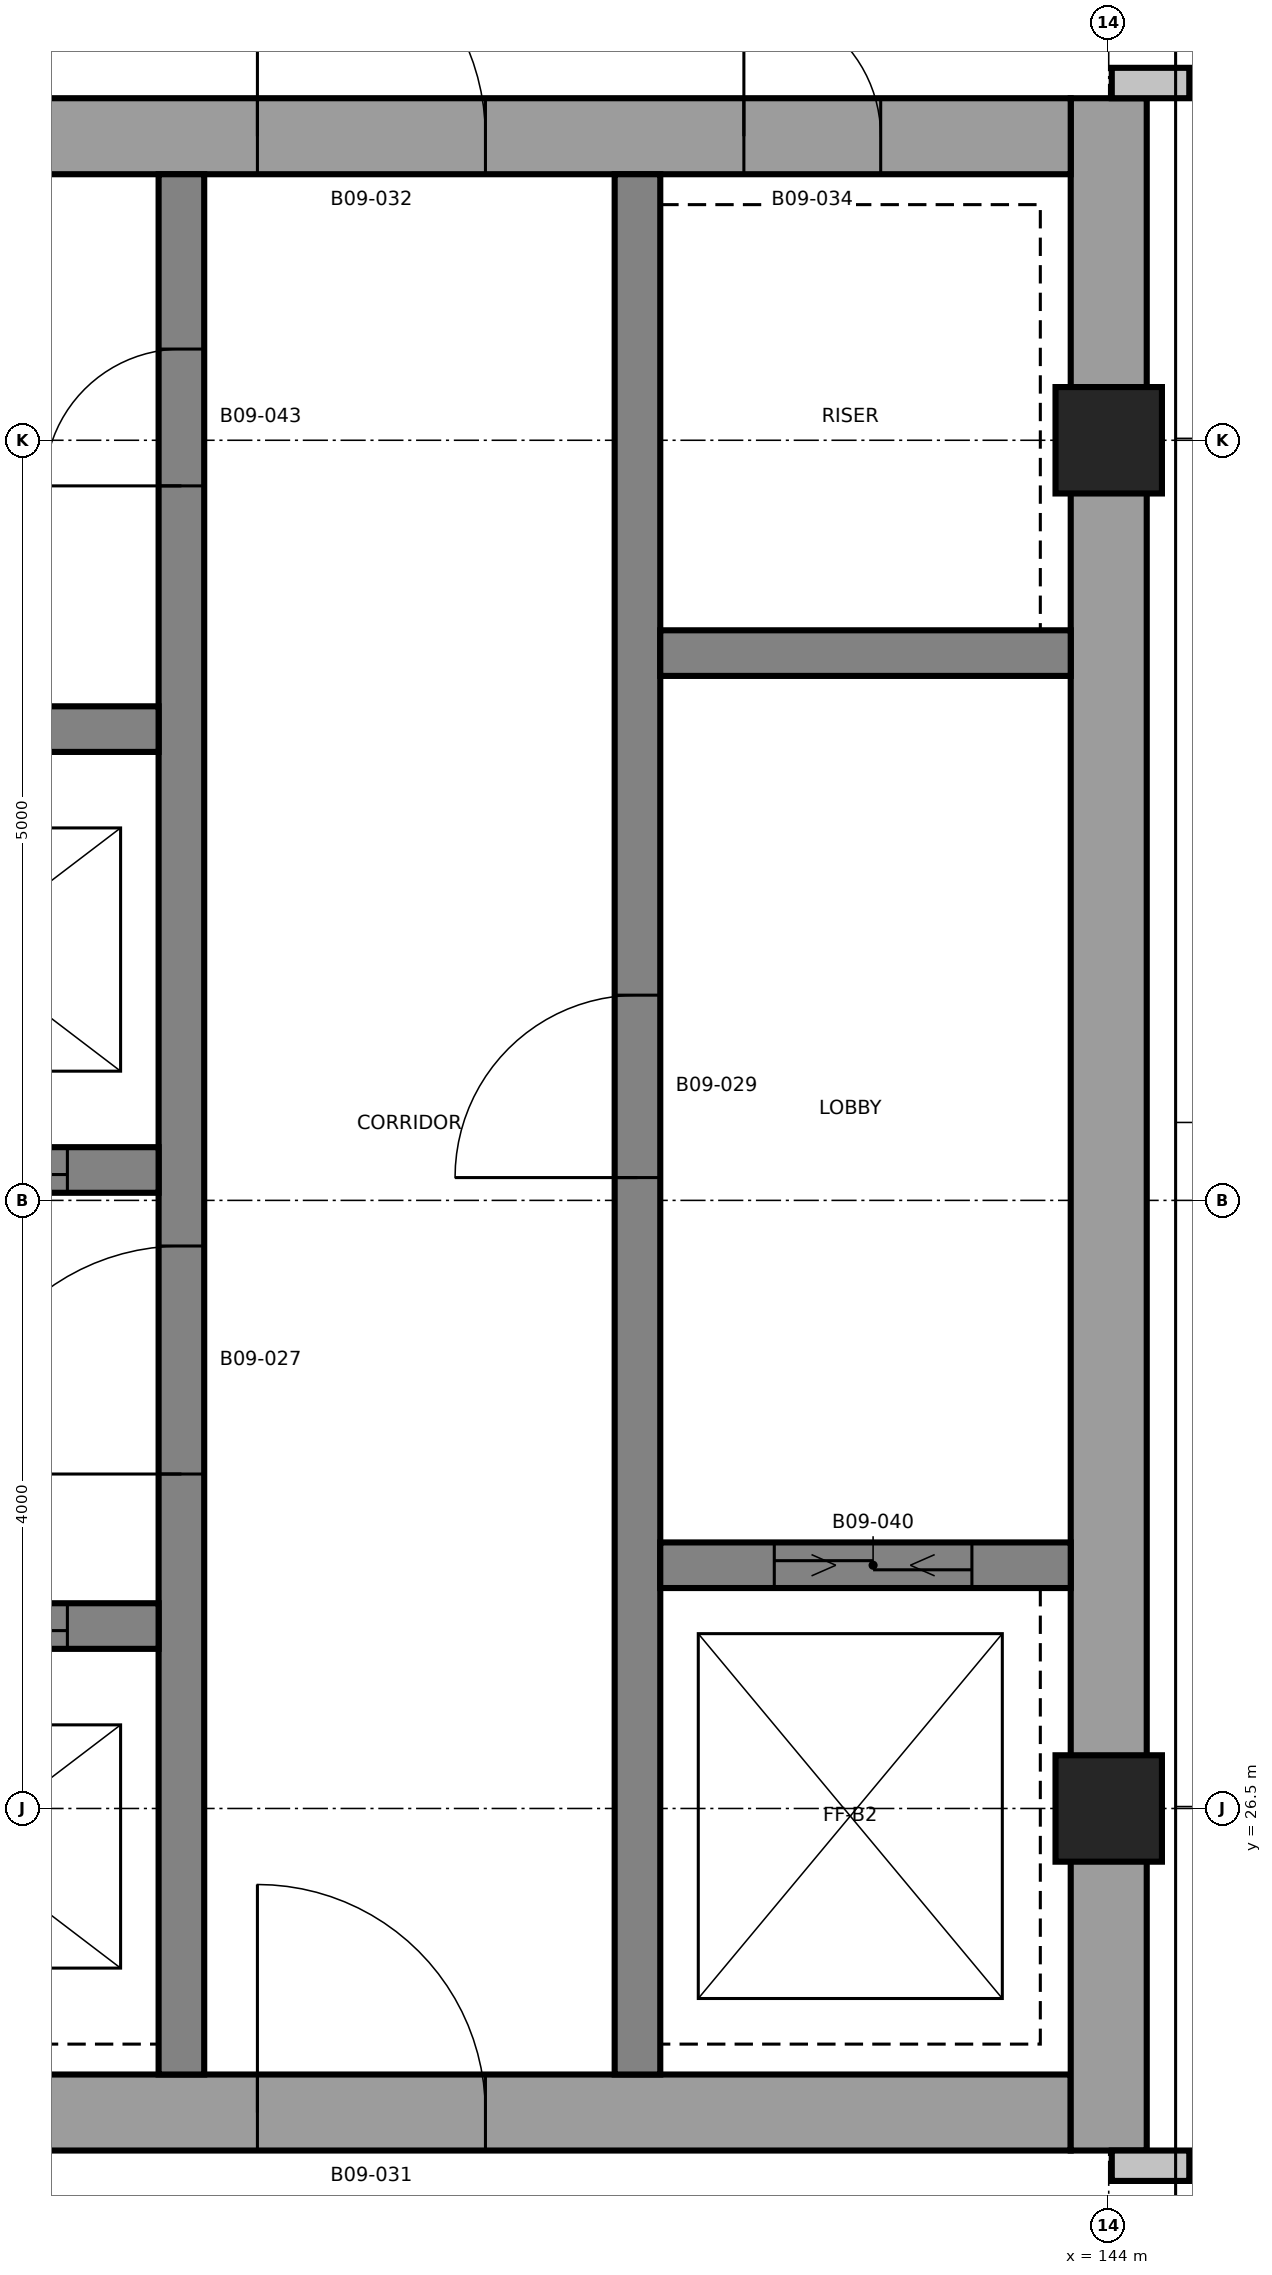
"""IFC4 building model, lengths in metres.
Left out: names, types, materials, properties, quantities, classifications, styles, units other than length and angle.
Written with IfcOpenShell. Run it as: python <this file> out.ifc"""

import sys

from ifc_helpers import new_model, si_unit, direction, frame, frame_2d, origin, origin_2d, place, context, subcontext, project, spatial, rectangle, extrude, element, fill, save


model = new_model("IFC4")
c1 = context("Model", 3, precision=1e-05, world=origin(), true_north=direction((0.0, 1.0)))
c2 = subcontext(c1, "Body", "Model", "MODEL_VIEW")
j1 = project(units=[si_unit("LENGTHUNIT", "METRE"), si_unit("PLANEANGLEUNIT", "RADIAN")], contexts=[c1])
p1 = place(None, origin())
s1 = spatial("IfcSite", under=j1, at=p1, CompositionType="ELEMENT")
p2 = place(p1, origin())
s2 = spatial("IfcBuilding", under=s1, at=p2, CompositionType="ELEMENT")
p3 = place(p2, frame((0.0, 0.0, 98.2)))
s3 = spatial("IfcBuildingStorey", under=s2, at=p3, CompositionType="ELEMENT", Elevation=98.2)
p4 = place(p3, frame((128.75, 24.5, 0.0), z_axis=(0.0, 0.0, 1.0), x_axis=(1.0, 0.0, 0.0)))
e1 = element("IfcWall", 1, at=p4, inside=s3, PredefinedType="SHEAR", context=c2, shape_type="SweptSolid", body=[
    extrude(rectangle(XDim=15.0, YDim=0.5, at=frame_2d((7.5, 0.0))), origin(), (0.0, 0.0, 1.0), 3.7),
])
p5 = place(p4, frame((9.65, 0.0, 0.0)))
e2 = element("IfcOpeningElement", 2, at=p5, cuts=e1, PredefinedType="OPENING", context=c2, shape_type="SweptSolid", body=[
    extrude(rectangle(XDim=1.5, YDim=2.1, at=frame_2d((0.75, 1.05))), frame((0.0, 0.26, 0.0), z_axis=(0.0, -1.0, 0.0), x_axis=(1.0, 0.0, 0.0)), (0.0, 0.0, 1.0), 0.52),
])
p6 = place(p4, frame((1.25, 0.0, 0.0)))
e3 = element("IfcOpeningElement", 3, at=p6, cuts=e1, PredefinedType="OPENING", context=c2, shape_type="SweptSolid", body=[
    extrude(rectangle(XDim=0.9, YDim=2.1, at=frame_2d((0.45, 1.05))), frame((0.0, 0.26, 0.0), z_axis=(0.0, -1.0, 0.0), x_axis=(1.0, 0.0, 0.0)), (0.0, 0.0, 1.0), 0.52),
])
p7 = place(p3, frame((144.0, 24.25, 0.0), z_axis=(0.0, 0.0, 1.0), x_axis=(0.0, 1.0, 0.0)))
e4 = element("IfcWall", 4, at=p7, inside=s3, PredefinedType="SHEAR", context=c2, shape_type="SweptSolid", body=[
    extrude(rectangle(XDim=13.5, YDim=0.5, at=frame_2d((6.75, 0.0))), origin(), (0.0, 0.0, 1.0), 3.7),
])
p8 = place(p3, frame((128.75, 37.5, 0.0), z_axis=(0.0, 0.0, 1.0), x_axis=(1.0, 0.0, 0.0)))
e5 = element("IfcWall", 5, at=p8, inside=s3, PredefinedType="SHEAR", context=c2, shape_type="SweptSolid", body=[
    extrude(rectangle(XDim=15.0, YDim=0.5, at=frame_2d((7.5, 0.0))), origin(), (0.0, 0.0, 1.0), 3.7),
])
p9 = place(p8, frame((9.65, 0.0, 0.0)))
e6 = element("IfcOpeningElement", 6, at=p9, cuts=e5, PredefinedType="OPENING", context=c2, shape_type="SweptSolid", body=[
    extrude(rectangle(XDim=1.5, YDim=2.1, at=frame_2d((0.75, 1.05))), frame((0.0, 0.26, 0.0), z_axis=(0.0, -1.0, 0.0), x_axis=(1.0, 0.0, 0.0)), (0.0, 0.0, 1.0), 0.52),
])
p10 = place(p8, frame((12.85, 0.0, 0.0)))
e7 = element("IfcOpeningElement", 7, at=p10, cuts=e5, PredefinedType="OPENING", context=c2, shape_type="SweptSolid", body=[
    extrude(rectangle(XDim=0.9, YDim=2.1, at=frame_2d((0.45, 1.05))), frame((0.0, 0.26, 0.0), z_axis=(0.0, -1.0, 0.0), x_axis=(1.0, 0.0, 0.0)), (0.0, 0.0, 1.0), 0.52),
])
p11 = place(p8, frame((3.6, 0.0, 0.0)))
e8 = element("IfcOpeningElement", 8, at=p11, cuts=e5, PredefinedType="OPENING", context=c2, shape_type="SweptSolid", body=[
    extrude(rectangle(XDim=0.9, YDim=2.1, at=frame_2d((0.45, 1.05))), frame((0.0, 0.26, 0.0), z_axis=(0.0, -1.0, 0.0), x_axis=(1.0, 0.0, 0.0)), (0.0, 0.0, 1.0), 0.52),
])
p12 = place(p8, frame((6.5, 0.0, 0.0)))
e9 = element("IfcOpeningElement", 9, at=p12, cuts=e5, PredefinedType="OPENING", context=c2, shape_type="SweptSolid", body=[
    extrude(rectangle(XDim=0.9, YDim=2.1, at=frame_2d((0.45, 1.05))), frame((0.0, 0.26, 0.0), z_axis=(0.0, -1.0, 0.0), x_axis=(1.0, 0.0, 0.0)), (0.0, 0.0, 1.0), 0.52),
])
p13 = place(p3, frame((137.9, 24.75, 0.0), z_axis=(0.0, 0.0, 1.0), x_axis=(0.0, 1.0, 0.0)))
e10 = element("IfcWall", 10, at=p13, inside=s3, PredefinedType="SHEAR", context=c2, shape_type="SweptSolid", body=[
    extrude(rectangle(XDim=12.5, YDim=0.3, at=frame_2d((6.25, 0.0))), origin(), (0.0, 0.0, 1.0), 3.7),
])
p14 = place(p13, frame((3.95, 0.0, 0.0)))
e11 = element("IfcOpeningElement", 11, at=p14, cuts=e10, PredefinedType="OPENING", context=c2, shape_type="SweptSolid", body=[
    extrude(rectangle(XDim=1.5, YDim=2.1, at=frame_2d((0.75, 1.05))), frame((0.0, 0.16, 0.0), z_axis=(0.0, -1.0, 0.0), x_axis=(1.0, 0.0, 0.0)), (0.0, 0.0, 1.0), 0.32),
])
p15 = place(p13, frame((10.45, 0.0, 0.0)))
e12 = element("IfcOpeningElement", 12, at=p15, cuts=e10, PredefinedType="OPENING", context=c2, shape_type="SweptSolid", body=[
    extrude(rectangle(XDim=0.9, YDim=2.1, at=frame_2d((0.45, 1.05))), frame((0.0, 0.16, 0.0), z_axis=(0.0, -1.0, 0.0), x_axis=(1.0, 0.0, 0.0)), (0.0, 0.0, 1.0), 0.32),
])
p16 = place(p3, frame((140.9, 24.75, 0.0), z_axis=(0.0, 0.0, 1.0), x_axis=(0.0, 1.0, 0.0)))
e13 = element("IfcWall", 13, at=p16, inside=s3, PredefinedType="SHEAR", context=c2, shape_type="SweptSolid", body=[
    extrude(rectangle(XDim=12.5, YDim=0.3, at=frame_2d((6.25, 0.0))), origin(), (0.0, 0.0, 1.0), 3.7),
])
p17 = place(p16, frame((5.9, 0.0, 0.0)))
e14 = element("IfcOpeningElement", 14, at=p17, cuts=e13, PredefinedType="OPENING", context=c2, shape_type="SweptSolid", body=[
    extrude(rectangle(XDim=1.2, YDim=2.1, at=frame_2d((0.6, 1.05))), frame((0.0, 0.16, 0.0), z_axis=(0.0, -1.0, 0.0), x_axis=(1.0, 0.0, 0.0)), (0.0, 0.0, 1.0), 0.32),
])
p18 = place(p3, frame((132.25, 27.7, 0.0), z_axis=(0.0, 0.0, 1.0), x_axis=(1.0, 0.0, 0.0)))
e15 = element("IfcWall", 15, at=p18, inside=s3, PredefinedType="SHEAR", context=c2, shape_type="SweptSolid", body=[
    extrude(rectangle(XDim=5.5, YDim=0.3, at=frame_2d((2.75, 0.0))), origin(), (0.0, 0.0, 1.0), 3.7),
])
p19 = place(p18, frame((0.9, 0.0, 0.0)))
e16 = element("IfcOpeningElement", 16, at=p19, cuts=e15, PredefinedType="OPENING", context=c2, shape_type="SweptSolid", body=[
    extrude(rectangle(XDim=1.1, YDim=2.4, at=frame_2d((0.55, 1.2))), frame((0.0, 0.16, 0.0), z_axis=(0.0, -1.0, 0.0), x_axis=(1.0, 0.0, 0.0)), (0.0, 0.0, 1.0), 0.32),
])
p20 = place(p18, frame((3.8, 0.0, 0.0)))
e17 = element("IfcOpeningElement", 17, at=p20, cuts=e15, PredefinedType="OPENING", context=c2, shape_type="SweptSolid", body=[
    extrude(rectangle(XDim=1.1, YDim=2.4, at=frame_2d((0.55, 1.2))), frame((0.0, 0.16, 0.0), z_axis=(0.0, -1.0, 0.0), x_axis=(1.0, 0.0, 0.0)), (0.0, 0.0, 1.0), 0.32),
])
p21 = place(p3, frame((132.25, 30.7, 0.0), z_axis=(0.0, 0.0, 1.0), x_axis=(1.0, 0.0, 0.0)))
e18 = element("IfcWall", 18, at=p21, inside=s3, PredefinedType="SHEAR", context=c2, shape_type="SweptSolid", body=[
    extrude(rectangle(XDim=5.5, YDim=0.3, at=frame_2d((2.75, 0.0))), origin(), (0.0, 0.0, 1.0), 3.7),
])
p22 = place(p21, frame((0.9, 0.0, 0.0)))
e19 = element("IfcOpeningElement", 19, at=p22, cuts=e18, PredefinedType="OPENING", context=c2, shape_type="SweptSolid", body=[
    extrude(rectangle(XDim=1.1, YDim=2.4, at=frame_2d((0.55, 1.2))), frame((0.0, 0.16, 0.0), z_axis=(0.0, -1.0, 0.0), x_axis=(1.0, 0.0, 0.0)), (0.0, 0.0, 1.0), 0.32),
])
p23 = place(p21, frame((3.8, 0.0, 0.0)))
e20 = element("IfcOpeningElement", 20, at=p23, cuts=e18, PredefinedType="OPENING", context=c2, shape_type="SweptSolid", body=[
    extrude(rectangle(XDim=1.1, YDim=2.4, at=frame_2d((0.55, 1.2))), frame((0.0, 0.16, 0.0), z_axis=(0.0, -1.0, 0.0), x_axis=(1.0, 0.0, 0.0)), (0.0, 0.0, 1.0), 0.32),
])
p24 = place(p3, frame((132.25, 33.6, 0.0), z_axis=(0.0, 0.0, 1.0), x_axis=(1.0, 0.0, 0.0)))
e21 = element("IfcWall", 21, at=p24, inside=s3, PredefinedType="SHEAR", context=c2, shape_type="SweptSolid", body=[
    extrude(rectangle(XDim=5.5, YDim=0.3, at=frame_2d((2.75, 0.0))), origin(), (0.0, 0.0, 1.0), 3.7),
])
p25 = place(p3, frame((141.05, 28.1, 0.0), z_axis=(0.0, 0.0, 1.0), x_axis=(1.0, 0.0, 0.0)))
e22 = element("IfcWall", 22, at=p25, inside=s3, PredefinedType="SHEAR", context=c2, shape_type="SweptSolid", body=[
    extrude(rectangle(XDim=2.7, YDim=0.3, at=frame_2d((1.35, 0.0))), origin(), (0.0, 0.0, 1.0), 3.7),
])
p26 = place(p25, frame((0.75, 0.0, 0.0)))
e23 = element("IfcOpeningElement", 23, at=p26, cuts=e22, PredefinedType="OPENING", context=c2, shape_type="SweptSolid", body=[
    extrude(rectangle(XDim=1.3, YDim=2.4, at=frame_2d((0.65, 1.2))), frame((0.0, 0.16, 0.0), z_axis=(0.0, -1.0, 0.0), x_axis=(1.0, 0.0, 0.0)), (0.0, 0.0, 1.0), 0.32),
])
p27 = place(p3, frame((141.05, 34.1, 0.0), z_axis=(0.0, 0.0, 1.0), x_axis=(1.0, 0.0, 0.0)))
e24 = element("IfcWall", 24, at=p27, inside=s3, PredefinedType="SHEAR", context=c2, shape_type="SweptSolid", body=[
    extrude(rectangle(XDim=2.7, YDim=0.3, at=frame_2d((1.35, 0.0))), origin(), (0.0, 0.0, 1.0), 3.7),
])
for number, where, z_axis, x_axis in (
    (25, (144.0, 26.5, 0.0), (0.0, 0.0, 1.0), (1.0, 0.0, 0.0)),
    (26, (144.0, 35.5, 0.0), (0.0, 0.0, 1.0), (1.0, 0.0, 0.0)),
):
    element("IfcColumn", number, at=place(p3, frame(where, z_axis=z_axis, x_axis=x_axis)), inside=s3, PredefinedType="COLUMN", context=c2, shape_type="SweptSolid", body=[
        extrude(rectangle(XDim=0.7, YDim=0.7, at=origin_2d()), origin(), (0.0, 0.0, 1.0), 3.7),
    ])
for number, where, z_axis, x_axis in (
    (27, (144.02, 24.15, 0.0), (0.0, 0.0, 1.0), (1.0, 0.0, 0.0)),
    (28, (144.02, 37.85, 0.0), (0.0, 0.0, 1.0), (1.0, 0.0, 0.0)),
):
    element("IfcWall", number, at=place(p3, frame(where, z_axis=z_axis, x_axis=x_axis)), inside=s3, PredefinedType="PARTITIONING", context=c2, shape_type="SweptSolid", body=[
        extrude(rectangle(XDim=0.51, YDim=0.2, at=frame_2d((0.255, 0.0))), origin(), (0.0, 0.0, 1.0), 3.4),
    ])
p28 = place(p14, origin())
e29 = element("IfcDoor", 29, at=p28, inside=s3, OperationType="SINGLE_SWING_RIGHT", PredefinedType="DOOR", context=c2, shape_type="SweptSolid", body=[
    extrude(rectangle(XDim=1.5, YDim=2.1, at=frame_2d((0.75, 1.05))), frame((0.0, 0.025, 0.0), z_axis=(0.0, -1.0, 0.0), x_axis=(1.0, 0.0, 0.0)), (0.0, 0.0, 1.0), 0.05),
])
fill(e11, e29)
p29 = place(p17, origin())
e30 = element("IfcDoor", 30, at=p29, inside=s3, OperationType="SINGLE_SWING_RIGHT", PredefinedType="DOOR", context=c2, shape_type="SweptSolid", body=[
    extrude(rectangle(XDim=1.2, YDim=2.1, at=frame_2d((0.6, 1.05))), frame((0.0, 0.025, 0.0), z_axis=(0.0, -1.0, 0.0), x_axis=(1.0, 0.0, 0.0)), (0.0, 0.0, 1.0), 0.05),
])
fill(e14, e30)
p30 = place(p5, origin())
e31 = element("IfcDoor", 31, at=p30, inside=s3, OperationType="SINGLE_SWING_LEFT", PredefinedType="DOOR", context=c2, shape_type="SweptSolid", body=[
    extrude(rectangle(XDim=1.5, YDim=2.1, at=frame_2d((0.75, 1.05))), frame((0.0, 0.025, 0.0), z_axis=(0.0, -1.0, 0.0), x_axis=(1.0, 0.0, 0.0)), (0.0, 0.0, 1.0), 0.05),
])
fill(e2, e31)
p31 = place(p9, origin())
e32 = element("IfcDoor", 32, at=p31, inside=s3, OperationType="SINGLE_SWING_RIGHT", PredefinedType="DOOR", context=c2, shape_type="SweptSolid", body=[
    extrude(rectangle(XDim=1.5, YDim=2.1, at=frame_2d((0.75, 1.05))), frame((0.0, 0.025, 0.0), z_axis=(0.0, -1.0, 0.0), x_axis=(1.0, 0.0, 0.0)), (0.0, 0.0, 1.0), 0.05),
])
fill(e6, e32)
p32 = place(p10, origin())
e33 = element("IfcDoor", 33, at=p32, inside=s3, OperationType="SINGLE_SWING_RIGHT", PredefinedType="DOOR", context=c2, shape_type="SweptSolid", body=[
    extrude(rectangle(XDim=0.9, YDim=2.1, at=frame_2d((0.45, 1.05))), frame((0.0, 0.025, 0.0), z_axis=(0.0, -1.0, 0.0), x_axis=(1.0, 0.0, 0.0)), (0.0, 0.0, 1.0), 0.05),
])
fill(e7, e33)
p33 = place(p20, origin())
e34 = element("IfcDoor", 34, at=p33, inside=s3, OperationType="SLIDING_TO_LEFT", PredefinedType="DOOR", context=c2, shape_type="SweptSolid", body=[
    extrude(rectangle(XDim=1.1, YDim=2.4, at=frame_2d((0.55, 1.2))), frame((0.0, 0.025, 0.0), z_axis=(0.0, -1.0, 0.0), x_axis=(1.0, 0.0, 0.0)), (0.0, 0.0, 1.0), 0.05),
])
fill(e17, e34)
p34 = place(p23, origin())
e35 = element("IfcDoor", 35, at=p34, inside=s3, OperationType="SLIDING_TO_LEFT", PredefinedType="DOOR", context=c2, shape_type="SweptSolid", body=[
    extrude(rectangle(XDim=1.1, YDim=2.4, at=frame_2d((0.55, 1.2))), frame((0.0, 0.025, 0.0), z_axis=(0.0, -1.0, 0.0), x_axis=(1.0, 0.0, 0.0)), (0.0, 0.0, 1.0), 0.05),
])
fill(e20, e35)
p35 = place(p26, origin())
e36 = element("IfcDoor", 36, at=p35, inside=s3, OperationType="SLIDING_TO_LEFT", PredefinedType="DOOR", context=c2, shape_type="SweptSolid", body=[
    extrude(rectangle(XDim=1.3, YDim=2.4, at=frame_2d((0.65, 1.2))), frame((0.0, 0.025, 0.0), z_axis=(0.0, -1.0, 0.0), x_axis=(1.0, 0.0, 0.0)), (0.0, 0.0, 1.0), 0.05),
])
fill(e23, e36)
p36 = place(p15, origin())
e37 = element("IfcDoor", 37, at=p36, inside=s3, OperationType="SINGLE_SWING_RIGHT", PredefinedType="DOOR", context=c2, shape_type="SweptSolid", body=[
    extrude(rectangle(XDim=0.9, YDim=2.1, at=frame_2d((0.45, 1.05))), frame((0.0, 0.025, 0.0), z_axis=(0.0, -1.0, 0.0), x_axis=(1.0, 0.0, 0.0)), (0.0, 0.0, 1.0), 0.05),
])
fill(e12, e37)
save(model, sys.argv[1])
